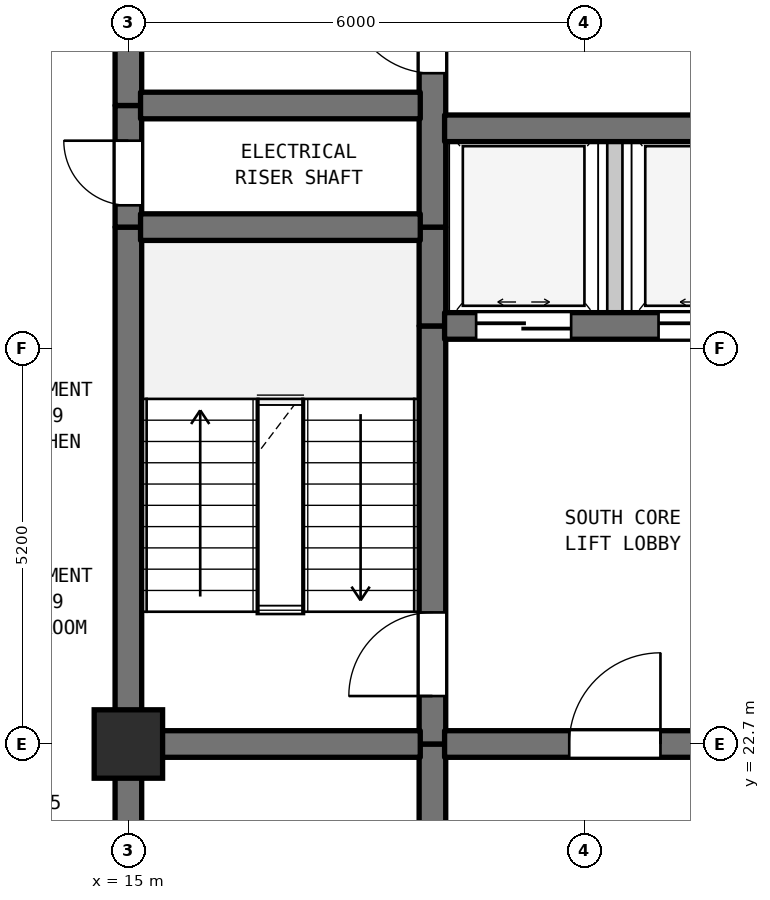
"""IFC4 building model, lengths in metres.
Left out: names, types, materials, properties, quantities, classifications, styles, units other than length and angle.
Written with IfcOpenShell. Run it as: python <this file> out.ifc"""

import sys

from ifc_helpers import new_model, si_unit, direction, frame, frame_2d, origin, origin_2d, place, context, subcontext, project, spatial, rectangle, extrude, element, fill, save


model = new_model("IFC4")
c1 = context("Model", 3, precision=1e-05, world=origin(), true_north=direction((0.0, 1.0)))
c2 = subcontext(c1, "Body", "Model", "MODEL_VIEW")
j1 = project(units=[si_unit("LENGTHUNIT", "METRE"), si_unit("PLANEANGLEUNIT", "RADIAN")], contexts=[c1])
p1 = place(None, origin())
s1 = spatial("IfcSite", under=j1, at=p1, CompositionType="ELEMENT")
p2 = place(p1, origin())
s2 = spatial("IfcBuilding", under=s1, at=p2, CompositionType="ELEMENT")
p3 = place(p2, frame((0.0, 0.0, 180.2)))
s3 = spatial("IfcBuildingStorey", under=s2, at=p3, CompositionType="ELEMENT", Elevation=180.2)
p4 = place(p3, frame((15.0, 22.7, 0.0), z_axis=(0.0, 0.0, 1.0), x_axis=(1.0, 0.0, 0.0)))
e1 = element("IfcColumn", 1, at=p4, inside=s3, PredefinedType="COLUMN", context=c2, shape_type="SweptSolid", body=[
    extrude(rectangle(XDim=0.9, YDim=0.9, at=origin_2d()), origin(), (0.0, 0.0, 1.0), 3.7),
])
p5 = place(p3, frame((15.0, 19.5, 0.0), z_axis=(0.0, 0.0, 1.0), x_axis=(0.0, 1.0, 0.0)))
e2 = element("IfcWall", 2, at=p5, inside=s3, PredefinedType="SHEAR", context=c2, shape_type="SweptSolid", body=[
    extrude(rectangle(XDim=3.2, YDim=0.35, at=frame_2d((1.6, 0.0))), origin(), (0.0, 0.0, 1.0), 3.38),
])
p6 = place(p3, frame((15.0, 22.7, 0.0), z_axis=(0.0, 0.0, 1.0), x_axis=(0.0, 1.0, 0.0)))
e3 = element("IfcWall", 3, at=p6, inside=s3, PredefinedType="SHEAR", context=c2, shape_type="SweptSolid", body=[
    extrude(rectangle(XDim=6.8, YDim=0.35, at=frame_2d((3.4, 0.0))), origin(), (0.0, 0.0, 1.0), 3.38),
])
p7 = place(p3, frame((15.0, 29.5, 0.0), z_axis=(0.0, 0.0, 1.0), x_axis=(0.0, 1.0, 0.0)))
e4 = element("IfcWall", 4, at=p7, inside=s3, PredefinedType="SHEAR", context=c2, shape_type="SweptSolid", body=[
    extrude(rectangle(XDim=1.6, YDim=0.35, at=frame_2d((0.8, 0.0))), origin(), (0.0, 0.0, 1.0), 3.38),
])
p8 = place(p7, frame((0.287, 0.0, 0.0)))
e5 = element("IfcOpeningElement", 5, at=p8, cuts=e4, PredefinedType="OPENING", context=c2, shape_type="SweptSolid", body=[
    extrude(rectangle(XDim=0.85, YDim=2.1, at=frame_2d((0.425, 1.05))), frame((0.0, 0.185, 0.0), z_axis=(0.0, -1.0, 0.0), x_axis=(1.0, 0.0, 0.0)), (0.0, 0.0, 1.0), 0.37),
])
p9 = place(p3, frame((15.0, 31.1, 0.0), z_axis=(0.0, 0.0, 1.0), x_axis=(0.0, 1.0, 0.0)))
e6 = element("IfcWall", 6, at=p9, inside=s3, PredefinedType="SHEAR", context=c2, shape_type="SweptSolid", body=[
    extrude(rectangle(XDim=6.8, YDim=0.35, at=frame_2d((3.4, 0.0))), origin(), (0.0, 0.0, 1.0), 3.38),
])
p10 = place(p3, frame((19.0, 19.5, 0.0), z_axis=(0.0, 0.0, 1.0), x_axis=(0.0, 1.0, 0.0)))
e7 = element("IfcWall", 7, at=p10, inside=s3, PredefinedType="SHEAR", context=c2, shape_type="SweptSolid", body=[
    extrude(rectangle(XDim=3.2, YDim=0.35, at=frame_2d((1.6, 0.0))), origin(), (0.0, 0.0, 1.0), 3.38),
])
p11 = place(p3, frame((19.0, 22.7, 0.0), z_axis=(0.0, 0.0, 1.0), x_axis=(0.0, 1.0, 0.0)))
e8 = element("IfcWall", 8, at=p11, inside=s3, PredefinedType="SHEAR", context=c2, shape_type="SweptSolid", body=[
    extrude(rectangle(XDim=5.5, YDim=0.35, at=frame_2d((2.75, 0.0))), origin(), (0.0, 0.0, 1.0), 3.38),
])
p12 = place(p11, frame((0.631, 0.0, 0.0)))
e9 = element("IfcOpeningElement", 9, at=p12, cuts=e8, PredefinedType="OPENING", context=c2, shape_type="SweptSolid", body=[
    extrude(rectangle(XDim=1.1, YDim=2.15, at=frame_2d((0.55, 1.075))), frame((0.0, 0.185, 0.0), z_axis=(0.0, -1.0, 0.0), x_axis=(1.0, 0.0, 0.0)), (0.0, 0.0, 1.0), 0.37),
])
p13 = place(p3, frame((19.0, 28.2, 0.0), z_axis=(0.0, 0.0, 1.0), x_axis=(0.0, 1.0, 0.0)))
e10 = element("IfcWall", 10, at=p13, inside=s3, PredefinedType="SHEAR", context=c2, shape_type="SweptSolid", body=[
    extrude(rectangle(XDim=1.3, YDim=0.35, at=frame_2d((0.65, 0.0))), origin(), (0.0, 0.0, 1.0), 3.38),
])
p14 = place(p3, frame((19.0, 29.5, 0.0), z_axis=(0.0, 0.0, 1.0), x_axis=(0.0, 1.0, 0.0)))
e11 = element("IfcWall", 11, at=p14, inside=s3, PredefinedType="SHEAR", context=c2, shape_type="SweptSolid", body=[
    extrude(rectangle(XDim=5.5, YDim=0.35, at=frame_2d((2.75, 0.0))), origin(), (0.0, 0.0, 1.0), 3.38),
])
p15 = place(p14, frame((2.025, 0.0, 0.0)))
e12 = element("IfcOpeningElement", 12, at=p15, cuts=e11, PredefinedType="OPENING", context=c2, shape_type="SweptSolid", body=[
    extrude(rectangle(XDim=1.1, YDim=2.15, at=frame_2d((0.55, 1.075))), frame((0.0, 0.185, 0.0), z_axis=(0.0, -1.0, 0.0), x_axis=(1.0, 0.0, 0.0)), (0.0, 0.0, 1.0), 0.37),
])
p16 = place(p3, frame((21.4, 28.2, 0.0), z_axis=(0.0, 0.0, 1.0), x_axis=(0.0, 1.0, 0.0)))
e13 = element("IfcWall", 13, at=p16, inside=s3, PredefinedType="STANDARD", context=c2, shape_type="SweptSolid", body=[
    extrude(rectangle(XDim=2.6, YDim=0.2, at=frame_2d((1.3, 0.0))), origin(), (0.0, 0.0, 1.0), 3.38),
])
p17 = place(p3, frame((15.16, 22.7, 0.0), z_axis=(0.0, 0.0, 1.0), x_axis=(1.0, 0.0, 0.0)))
e14 = element("IfcWall", 14, at=p17, inside=s3, PredefinedType="SHEAR", context=c2, shape_type="SweptSolid", body=[
    extrude(rectangle(XDim=3.68, YDim=0.35, at=frame_2d((1.84, 0.0))), origin(), (0.0, 0.0, 1.0), 3.38),
])
p18 = place(p3, frame((19.16, 22.7, 0.0), z_axis=(0.0, 0.0, 1.0), x_axis=(1.0, 0.0, 0.0)))
e15 = element("IfcWall", 15, at=p18, inside=s3, PredefinedType="SHEAR", context=c2, shape_type="SweptSolid", body=[
    extrude(rectangle(XDim=4.48, YDim=0.35, at=frame_2d((2.24, 0.0))), origin(), (0.0, 0.0, 1.0), 3.38),
])
p19 = place(p18, frame((1.64, 0.0, 0.0)))
e16 = element("IfcOpeningElement", 16, at=p19, cuts=e15, PredefinedType="OPENING", context=c2, shape_type="SweptSolid", body=[
    extrude(rectangle(XDim=1.2, YDim=2.2, at=frame_2d((0.6, 1.1))), frame((0.0, 0.185, 0.0), z_axis=(0.0, -1.0, 0.0), x_axis=(1.0, 0.0, 0.0)), (0.0, 0.0, 1.0), 0.37),
])
p20 = place(p3, frame((19.16, 28.2, 0.0), z_axis=(0.0, 0.0, 1.0), x_axis=(1.0, 0.0, 0.0)))
e17 = element("IfcWall", 17, at=p20, inside=s3, PredefinedType="SHEAR", context=c2, shape_type="SweptSolid", body=[
    extrude(rectangle(XDim=4.48, YDim=0.35, at=frame_2d((2.24, 0.0))), origin(), (0.0, 0.0, 1.0), 3.38),
])
p21 = place(p20, frame((0.415, 0.0, 0.0)))
e18 = element("IfcOpeningElement", 18, at=p21, cuts=e17, PredefinedType="OPENING", context=c2, shape_type="SweptSolid", body=[
    extrude(rectangle(XDim=1.25, YDim=2.2, at=frame_2d((0.625, 1.1))), frame((0.0, 0.185, 0.0), z_axis=(0.0, -1.0, 0.0), x_axis=(1.0, 0.0, 0.0)), (0.0, 0.0, 1.0), 0.37),
])
p22 = place(p20, frame((2.815, 0.0, 0.0)))
e19 = element("IfcOpeningElement", 19, at=p22, cuts=e17, PredefinedType="OPENING", context=c2, shape_type="SweptSolid", body=[
    extrude(rectangle(XDim=1.25, YDim=2.2, at=frame_2d((0.625, 1.1))), frame((0.0, 0.185, 0.0), z_axis=(0.0, -1.0, 0.0), x_axis=(1.0, 0.0, 0.0)), (0.0, 0.0, 1.0), 0.37),
])
p23 = place(p3, frame((15.16, 29.5, 0.0), z_axis=(0.0, 0.0, 1.0), x_axis=(1.0, 0.0, 0.0)))
e20 = element("IfcWall", 20, at=p23, inside=s3, PredefinedType="SHEAR", context=c2, shape_type="SweptSolid", body=[
    extrude(rectangle(XDim=3.68, YDim=0.35, at=frame_2d((1.84, 0.0))), origin(), (0.0, 0.0, 1.0), 3.38),
])
p24 = place(p3, frame((19.16, 30.8, 0.0), z_axis=(0.0, 0.0, 1.0), x_axis=(1.0, 0.0, 0.0)))
e21 = element("IfcWall", 21, at=p24, inside=s3, PredefinedType="SHEAR", context=c2, shape_type="SweptSolid", body=[
    extrude(rectangle(XDim=4.48, YDim=0.35, at=frame_2d((2.24, 0.0))), origin(), (0.0, 0.0, 1.0), 3.38),
])
p25 = place(p3, frame((15.16, 31.1, 0.0), z_axis=(0.0, 0.0, 1.0), x_axis=(1.0, 0.0, 0.0)))
e22 = element("IfcWall", 22, at=p25, inside=s3, PredefinedType="SHEAR", context=c2, shape_type="SweptSolid", body=[
    extrude(rectangle(XDim=3.68, YDim=0.35, at=frame_2d((1.84, 0.0))), origin(), (0.0, 0.0, 1.0), 3.38),
])
p26 = place(p8, origin())
e23 = element("IfcDoor", 23, at=p26, inside=s3, OperationType="SINGLE_SWING_RIGHT", PredefinedType="DOOR", context=c2, shape_type="SweptSolid", body=[
    extrude(rectangle(XDim=0.85, YDim=2.1, at=frame_2d((0.425, 1.05))), frame((0.0, 0.025, 0.0), z_axis=(0.0, -1.0, 0.0), x_axis=(1.0, 0.0, 0.0)), (0.0, 0.0, 1.0), 0.05),
])
fill(e5, e23)
p27 = place(p12, origin())
e24 = element("IfcDoor", 24, at=p27, inside=s3, OperationType="SINGLE_SWING_LEFT", PredefinedType="DOOR", context=c2, shape_type="SweptSolid", body=[
    extrude(rectangle(XDim=1.1, YDim=2.15, at=frame_2d((0.55, 1.075))), frame((0.0, 0.025, 0.0), z_axis=(0.0, -1.0, 0.0), x_axis=(1.0, 0.0, 0.0)), (0.0, 0.0, 1.0), 0.05),
])
fill(e9, e24)
p28 = place(p15, origin())
e25 = element("IfcDoor", 25, at=p28, inside=s3, OperationType="SINGLE_SWING_RIGHT", PredefinedType="DOOR", context=c2, shape_type="SweptSolid", body=[
    extrude(rectangle(XDim=1.1, YDim=2.15, at=frame_2d((0.55, 1.075))), frame((0.0, 0.025, 0.0), z_axis=(0.0, -1.0, 0.0), x_axis=(1.0, 0.0, 0.0)), (0.0, 0.0, 1.0), 0.05),
])
fill(e12, e25)
p29 = place(p19, origin())
e26 = element("IfcDoor", 26, at=p29, inside=s3, OperationType="SINGLE_SWING_RIGHT", PredefinedType="DOOR", context=c2, shape_type="SweptSolid", body=[
    extrude(rectangle(XDim=1.2, YDim=2.2, at=frame_2d((0.6, 1.1))), frame((0.0, 0.025, 0.0), z_axis=(0.0, -1.0, 0.0), x_axis=(1.0, 0.0, 0.0)), (0.0, 0.0, 1.0), 0.05),
])
fill(e16, e26)
p30 = place(p21, origin())
e27 = element("IfcDoor", 27, at=p30, inside=s3, OperationType="DOUBLE_DOOR_SLIDING", PredefinedType="DOOR", context=c2, shape_type="SweptSolid", body=[
    extrude(rectangle(XDim=1.25, YDim=2.2, at=frame_2d((0.625, 1.1))), frame((0.0, 0.025, 0.0), z_axis=(0.0, -1.0, 0.0), x_axis=(1.0, 0.0, 0.0)), (0.0, 0.0, 1.0), 0.05),
])
fill(e18, e27)
p31 = place(p22, origin())
e28 = element("IfcDoor", 28, at=p31, inside=s3, OperationType="DOUBLE_DOOR_SLIDING", PredefinedType="DOOR", context=c2, shape_type="SweptSolid", body=[
    extrude(rectangle(XDim=1.25, YDim=2.2, at=frame_2d((0.625, 1.1))), frame((0.0, 0.025, 0.0), z_axis=(0.0, -1.0, 0.0), x_axis=(1.0, 0.0, 0.0)), (0.0, 0.0, 1.0), 0.05),
])
fill(e19, e28)
save(model, sys.argv[1])
